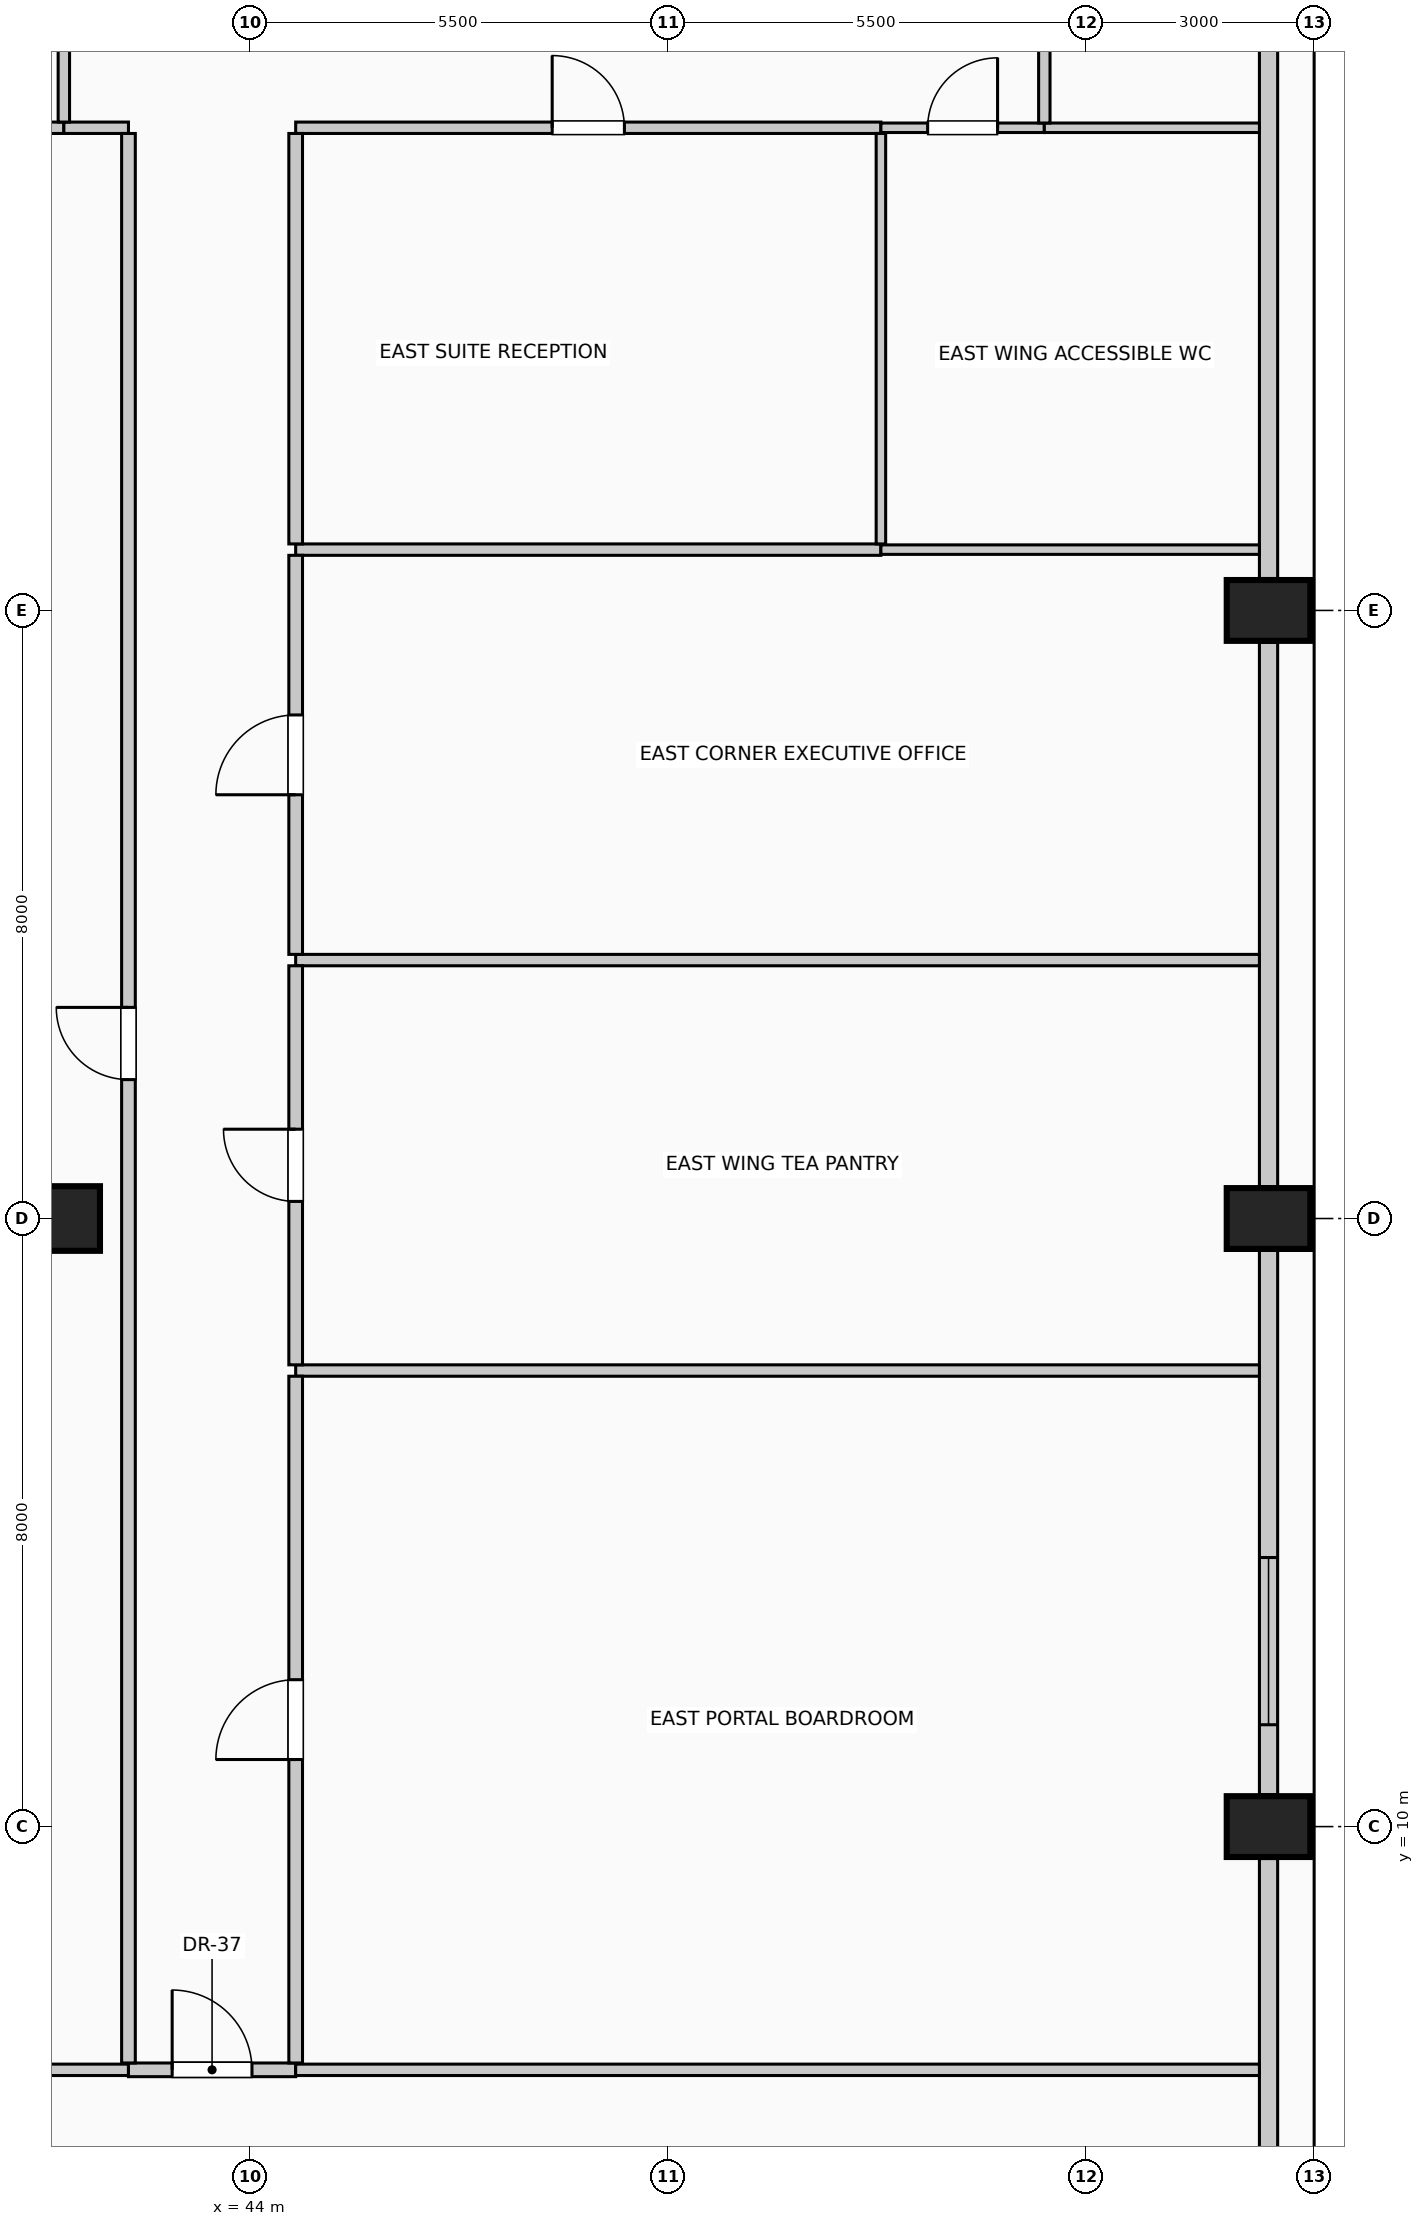
"""IFC4 building model, lengths in metres.
Left out: names, types, materials, properties, quantities, classifications, styles, units other than length and angle.
Written with IfcOpenShell. Run it as: python <this file> out.ifc"""

import sys

from ifc_helpers import new_model, si_unit, direction, frame, frame_2d, origin, origin_2d, place, context, subcontext, project, spatial, rectangle, circle, extrude, element, fill, save


model = new_model("IFC4")
c1 = context("Model", 3, precision=1e-05, world=origin(), true_north=direction((0.0, 1.0)))
c2 = subcontext(c1, "Body", "Model", "MODEL_VIEW")
j1 = project(units=[si_unit("LENGTHUNIT", "METRE"), si_unit("PLANEANGLEUNIT", "RADIAN")], contexts=[c1])
p1 = place(None, origin())
s1 = spatial("IfcSite", under=j1, at=p1, CompositionType="ELEMENT")
p2 = place(p1, origin())
s2 = spatial("IfcBuilding", under=s1, at=p2, CompositionType="ELEMENT")
p3 = place(p2, frame((0.0, 0.0, 186.6)))
s3 = spatial("IfcBuildingStorey", under=s2, at=p3, CompositionType="ELEMENT", Elevation=186.6)
for number, where, z_axis, x_axis in (
    (1, (57.4, 10.0, 0.0), (0.0, 0.0, 1.0), (0.0, 1.0, 0.0)),
    (2, (57.4, 18.0, 0.0), (0.0, 0.0, 1.0), (0.0, 1.0, 0.0)),
    (3, (57.4, 26.0, 0.0), (0.0, 0.0, 1.0), (0.0, 1.0, 0.0)),
):
    element("IfcColumn", number, at=place(p3, frame(where, z_axis=z_axis, x_axis=x_axis)), inside=s3, PredefinedType="COLUMN", context=c2, shape_type="SweptSolid", body=[
        extrude(rectangle(XDim=0.8, YDim=1.1, at=origin_2d()), origin(), (0.0, 0.0, 1.0), 4.0),
    ])
p4 = place(p3, frame((41.6, 18.0, 0.0), z_axis=(0.0, 0.0, 1.0), x_axis=(1.0, 0.0, 0.0)))
e4 = element("IfcColumn", 4, at=p4, inside=s3, PredefinedType="COLUMN", context=c2, shape_type="SweptSolid", body=[
    extrude(circle(Radius=0.425, at=origin_2d()), origin(), (0.0, 0.0, 1.0), 4.0),
])
p5 = place(p3, frame((57.4, 9.58, 0.0), z_axis=(0.0, 0.0, 1.0), x_axis=(0.0, -1.0, 0.0)))
e5 = element("IfcWall", 5, at=p5, inside=s3, PredefinedType="SOLIDWALL", context=c2, shape_type="SweptSolid", body=[
    extrude(rectangle(XDim=5.56, YDim=0.24, at=frame_2d((2.78, 0.0))), origin(), (0.0, 0.0, 1.0), 3.0),
])
p6 = place(p3, frame((57.4, 17.58, 0.0), z_axis=(0.0, 0.0, 1.0), x_axis=(0.0, -1.0, 0.0)))
e6 = element("IfcWall", 6, at=p6, inside=s3, PredefinedType="SOLIDWALL", context=c2, shape_type="SweptSolid", body=[
    extrude(rectangle(XDim=7.16, YDim=0.24, at=frame_2d((3.58, 0.0))), origin(), (0.0, 0.0, 1.0), 3.0),
])
p7 = place(p6, frame((4.04, 0.0, 0.42)))
e7 = element("IfcOpeningElement", 7, at=p7, cuts=e6, PredefinedType="OPENING", context=c2, shape_type="SweptSolid", body=[
    extrude(rectangle(XDim=2.2, YDim=1.95, at=frame_2d((1.1, 0.975))), frame((0.0, 0.13, 0.0), z_axis=(0.0, -1.0, 0.0), x_axis=(1.0, 0.0, 0.0)), (0.0, 0.0, 1.0), 0.26),
])
for number, where, z_axis, x_axis in (
    (8, (57.4, 25.58, 0.0), (0.0, 0.0, 1.0), (0.0, -1.0, 0.0)),
    (9, (57.4, 33.58, 0.0), (0.0, 0.0, 1.0), (0.0, -1.0, 0.0)),
):
    element("IfcWall", number, at=place(p3, frame(where, z_axis=z_axis, x_axis=x_axis)), inside=s3, PredefinedType="SOLIDWALL", context=c2, shape_type="SweptSolid", body=[
        extrude(rectangle(XDim=7.16, YDim=0.24, at=frame_2d((3.58, 0.0))), origin(), (0.0, 0.0, 1.0), 3.0),
    ])
p8 = place(p3, frame((34.12, 6.8, 0.0), z_axis=(0.0, 0.0, 1.0), x_axis=(1.0, 0.0, 0.0)))
e10 = element("IfcWall", 10, at=p8, inside=s3, PredefinedType="PARTITIONING", context=c2, shape_type="SweptSolid", body=[
    extrude(rectangle(XDim=8.28, YDim=0.15, at=frame_2d((4.14, 0.0))), origin(), (0.0, 0.0, 1.0), 3.245),
])
p9 = place(p3, frame((42.4, 6.8, 0.0), z_axis=(0.0, 0.0, 1.0), x_axis=(1.0, 0.0, 0.0)))
e11 = element("IfcWall", 11, at=p9, inside=s3, PredefinedType="PARTITIONING", context=c2, shape_type="SweptSolid", body=[
    extrude(rectangle(XDim=2.2, YDim=0.18, at=frame_2d((1.1, 0.0))), origin(), (0.0, 0.0, 1.0), 3.245),
])
p10 = place(p9, frame((0.575, 0.0, 0.0)))
e12 = element("IfcOpeningElement", 12, at=p10, cuts=e11, PredefinedType="OPENING", context=c2, shape_type="SweptSolid", body=[
    extrude(rectangle(XDim=1.05, YDim=2.15, at=frame_2d((0.525, 1.075))), frame((0.0, 0.1, 0.0), z_axis=(0.0, -1.0, 0.0), x_axis=(1.0, 0.0, 0.0)), (0.0, 0.0, 1.0), 0.2),
])
p11 = place(p3, frame((44.6, 6.8, 0.0), z_axis=(0.0, 0.0, 1.0), x_axis=(1.0, 0.0, 0.0)))
e13 = element("IfcWall", 13, at=p11, inside=s3, PredefinedType="PARTITIONING", context=c2, shape_type="SweptSolid", body=[
    extrude(rectangle(XDim=12.68, YDim=0.15, at=frame_2d((6.34, 0.0))), origin(), (0.0, 0.0, 1.0), 3.245),
])
for number, where, z_axis, x_axis in (
    (14, (44.6, 16.0, 0.0), (0.0, 0.0, 1.0), (1.0, 0.0, 0.0)),
    (15, (44.6, 21.4, 0.0), (0.0, 0.0, 1.0), (1.0, 0.0, 0.0)),
):
    element("IfcWall", number, at=place(p3, frame(where, z_axis=z_axis, x_axis=x_axis)), inside=s3, PredefinedType="PARTITIONING", context=c2, shape_type="SweptSolid", body=[
        extrude(rectangle(XDim=12.68, YDim=0.15, at=frame_2d((6.34, 0.0))), origin(), (0.0, 0.0, 1.0), 3.75),
    ])
p12 = place(p3, frame((44.6, 26.8, 0.0), z_axis=(0.0, 0.0, 1.0), x_axis=(1.0, 0.0, 0.0)))
e16 = element("IfcWall", 16, at=p12, inside=s3, PredefinedType="PARTITIONING", context=c2, shape_type="SweptSolid", body=[
    extrude(rectangle(XDim=7.7, YDim=0.15, at=frame_2d((3.85, 0.0))), origin(), (0.0, 0.0, 1.0), 3.75),
])
p13 = place(p3, frame((52.3, 26.8, 0.0), z_axis=(0.0, 0.0, 1.0), x_axis=(1.0, 0.0, 0.0)))
e17 = element("IfcWall", 17, at=p13, inside=s3, PredefinedType="PARTITIONING", context=c2, shape_type="SweptSolid", body=[
    extrude(rectangle(XDim=4.98, YDim=0.125, at=frame_2d((2.49, 0.0))), origin(), (0.0, 0.0, 1.0), 3.75),
])
p14 = place(p3, frame((34.12, 32.35, 0.0), z_axis=(0.0, 0.0, 1.0), x_axis=(1.0, 0.0, 0.0)))
e18 = element("IfcWall", 18, at=p14, inside=s3, PredefinedType="PARTITIONING", context=c2, shape_type="SweptSolid", body=[
    extrude(rectangle(XDim=7.43, YDim=0.15, at=frame_2d((3.715, 0.0))), origin(), (0.0, 0.0, 1.0), 3.75),
])
p15 = place(p3, frame((41.55, 32.35, 0.0), z_axis=(0.0, 0.0, 1.0), x_axis=(1.0, 0.0, 0.0)))
e19 = element("IfcWall", 19, at=p15, inside=s3, PredefinedType="PARTITIONING", context=c2, shape_type="SweptSolid", body=[
    extrude(rectangle(XDim=0.85, YDim=0.15, at=frame_2d((0.425, 0.0))), origin(), (0.0, 0.0, 1.0), 3.75),
])
p16 = place(p3, frame((44.6, 32.35, 0.0), z_axis=(0.0, 0.0, 1.0), x_axis=(1.0, 0.0, 0.0)))
e20 = element("IfcWall", 20, at=p16, inside=s3, PredefinedType="PARTITIONING", context=c2, shape_type="SweptSolid", body=[
    extrude(rectangle(XDim=7.7, YDim=0.15, at=frame_2d((3.85, 0.0))), origin(), (0.0, 0.0, 1.0), 3.75),
])
p17 = place(p16, frame((3.375, 0.0, 0.0)))
e21 = element("IfcOpeningElement", 21, at=p17, cuts=e20, PredefinedType="OPENING", context=c2, shape_type="SweptSolid", body=[
    extrude(rectangle(XDim=0.95, YDim=2.15, at=frame_2d((0.475, 1.075))), frame((0.0, 0.085, 0.0), z_axis=(0.0, -1.0, 0.0), x_axis=(1.0, 0.0, 0.0)), (0.0, 0.0, 1.0), 0.17),
])
p18 = place(p3, frame((52.3, 32.35, 0.0), z_axis=(0.0, 0.0, 1.0), x_axis=(1.0, 0.0, 0.0)))
e22 = element("IfcWall", 22, at=p18, inside=s3, PredefinedType="PARTITIONING", context=c2, shape_type="SweptSolid", body=[
    extrude(rectangle(XDim=2.15, YDim=0.125, at=frame_2d((1.075, 0.0))), origin(), (0.0, 0.0, 1.0), 3.75),
])
p19 = place(p18, frame((0.615, 0.0, 0.0)))
e23 = element("IfcOpeningElement", 23, at=p19, cuts=e22, PredefinedType="OPENING", context=c2, shape_type="SweptSolid", body=[
    extrude(rectangle(XDim=0.92, YDim=2.1, at=frame_2d((0.46, 1.05))), frame((0.0, 0.073, 0.0), z_axis=(0.0, -1.0, 0.0), x_axis=(1.0, 0.0, 0.0)), (0.0, 0.0, 1.0), 0.145),
])
p20 = place(p3, frame((54.45, 32.35, 0.0), z_axis=(0.0, 0.0, 1.0), x_axis=(1.0, 0.0, 0.0)))
e24 = element("IfcWall", 24, at=p20, inside=s3, PredefinedType="PARTITIONING", context=c2, shape_type="SweptSolid", body=[
    extrude(rectangle(XDim=2.83, YDim=0.125, at=frame_2d((1.415, 0.0))), origin(), (0.0, 0.0, 1.0), 3.75),
])
p21 = place(p3, frame((41.55, 32.425, 0.0), z_axis=(0.0, 0.0, 1.0), x_axis=(0.0, 1.0, 0.0)))
e25 = element("IfcWall", 25, at=p21, inside=s3, PredefinedType="PARTITIONING", context=c2, shape_type="SweptSolid", body=[
    extrude(rectangle(XDim=1.15, YDim=0.15, at=frame_2d((0.575, 0.0))), origin(), (0.0, 0.0, 1.0), 3.145),
])
p22 = place(p3, frame((42.4, 6.89, 0.0), z_axis=(0.0, 0.0, 1.0), x_axis=(0.0, 1.0, 0.0)))
e26 = element("IfcWall", 26, at=p22, inside=s3, PredefinedType="PARTITIONING", context=c2, shape_type="SweptSolid", body=[
    extrude(rectangle(XDim=25.385, YDim=0.18, at=frame_2d((12.692, 0.0))), origin(), (0.0, 0.0, 1.0), 3.75),
])
p23 = place(p22, frame((12.938, 0.0, 0.0)))
e27 = element("IfcOpeningElement", 27, at=p23, cuts=e26, PredefinedType="OPENING", context=c2, shape_type="SweptSolid", body=[
    extrude(rectangle(XDim=0.95, YDim=2.15, at=frame_2d((0.475, 1.075))), frame((0.0, 0.1, 0.0), z_axis=(0.0, -1.0, 0.0), x_axis=(1.0, 0.0, 0.0)), (0.0, 0.0, 1.0), 0.2),
])
p24 = place(p3, frame((44.6, 6.89, 0.0), z_axis=(0.0, 0.0, 1.0), x_axis=(0.0, 1.0, 0.0)))
e28 = element("IfcWall", 28, at=p24, inside=s3, PredefinedType="PARTITIONING", context=c2, shape_type="SweptSolid", body=[
    extrude(rectangle(XDim=9.035, YDim=0.18, at=frame_2d((4.518, 0.0))), origin(), (0.0, 0.0, 1.0), 3.75),
])
p25 = place(p24, frame((3.992, 0.0, 0.0)))
e29 = element("IfcOpeningElement", 29, at=p25, cuts=e28, PredefinedType="OPENING", context=c2, shape_type="SweptSolid", body=[
    extrude(rectangle(XDim=1.05, YDim=2.15, at=frame_2d((0.525, 1.075))), frame((0.0, 0.1, 0.0), z_axis=(0.0, -1.0, 0.0), x_axis=(1.0, 0.0, 0.0)), (0.0, 0.0, 1.0), 0.2),
])
p26 = place(p3, frame((44.6, 16.075, 0.0), z_axis=(0.0, 0.0, 1.0), x_axis=(0.0, 1.0, 0.0)))
e30 = element("IfcWall", 30, at=p26, inside=s3, PredefinedType="PARTITIONING", context=c2, shape_type="SweptSolid", body=[
    extrude(rectangle(XDim=5.25, YDim=0.18, at=frame_2d((2.625, 0.0))), origin(), (0.0, 0.0, 1.0), 3.75),
])
p27 = place(p26, frame((2.15, 0.0, 0.0)))
e31 = element("IfcOpeningElement", 31, at=p27, cuts=e30, PredefinedType="OPENING", context=c2, shape_type="SweptSolid", body=[
    extrude(rectangle(XDim=0.95, YDim=2.15, at=frame_2d((0.475, 1.075))), frame((0.0, 0.1, 0.0), z_axis=(0.0, -1.0, 0.0), x_axis=(1.0, 0.0, 0.0)), (0.0, 0.0, 1.0), 0.2),
])
p28 = place(p3, frame((44.6, 21.475, 0.0), z_axis=(0.0, 0.0, 1.0), x_axis=(0.0, 1.0, 0.0)))
e32 = element("IfcWall", 32, at=p28, inside=s3, PredefinedType="PARTITIONING", context=c2, shape_type="SweptSolid", body=[
    extrude(rectangle(XDim=5.25, YDim=0.18, at=frame_2d((2.625, 0.0))), origin(), (0.0, 0.0, 1.0), 3.75),
])
p29 = place(p28, frame((2.1, 0.0, 0.0)))
e33 = element("IfcOpeningElement", 33, at=p29, cuts=e32, PredefinedType="OPENING", context=c2, shape_type="SweptSolid", body=[
    extrude(rectangle(XDim=1.05, YDim=2.15, at=frame_2d((0.525, 1.075))), frame((0.0, 0.1, 0.0), z_axis=(0.0, -1.0, 0.0), x_axis=(1.0, 0.0, 0.0)), (0.0, 0.0, 1.0), 0.2),
])
p30 = place(p3, frame((44.6, 26.875, 0.0), z_axis=(0.0, 0.0, 1.0), x_axis=(0.0, 1.0, 0.0)))
e34 = element("IfcWall", 34, at=p30, inside=s3, PredefinedType="PARTITIONING", context=c2, shape_type="SweptSolid", body=[
    extrude(rectangle(XDim=5.4, YDim=0.18, at=frame_2d((2.7, 0.0))), origin(), (0.0, 0.0, 1.0), 3.75),
])
p31 = place(p3, frame((52.3, 26.875, 0.0), z_axis=(0.0, 0.0, 1.0), x_axis=(0.0, 1.0, 0.0)))
e35 = element("IfcWall", 35, at=p31, inside=s3, PredefinedType="PARTITIONING", context=c2, shape_type="SweptSolid", body=[
    extrude(rectangle(XDim=5.4, YDim=0.125, at=frame_2d((2.7, 0.0))), origin(), (0.0, 0.0, 1.0), 3.75),
])
p32 = place(p3, frame((54.45, 32.413, 0.0), z_axis=(0.0, 0.0, 1.0), x_axis=(0.0, 1.0, 0.0)))
e36 = element("IfcWall", 36, at=p32, inside=s3, PredefinedType="PARTITIONING", context=c2, shape_type="SweptSolid", body=[
    extrude(rectangle(XDim=1.737, YDim=0.15, at=frame_2d((0.869, 0.0))), origin(), (0.0, 0.0, 1.0), 3.75),
])
p33 = place(p7, origin())
e37 = element("IfcWindow", 37, at=p33, inside=s3, PartitioningType="SINGLE_PANEL", PredefinedType="WINDOW", context=c2, shape_type="SweptSolid", body=[
    extrude(rectangle(XDim=2.2, YDim=1.95, at=frame_2d((1.1, 0.975))), frame((0.0, 0.03, 0.0), z_axis=(0.0, -1.0, 0.0), x_axis=(1.0, 0.0, 0.0)), (0.0, 0.0, 1.0), 0.06),
])
fill(e7, e37)
p34 = place(p10, origin())
e38 = element("IfcDoor", 38, at=p34, inside=s3, OperationType="SINGLE_SWING_LEFT", PredefinedType="DOOR", context=c2, shape_type="SweptSolid", body=[
    extrude(rectangle(XDim=1.05, YDim=2.15, at=frame_2d((0.525, 1.075))), frame((0.0, 0.025, 0.0), z_axis=(0.0, -1.0, 0.0), x_axis=(1.0, 0.0, 0.0)), (0.0, 0.0, 1.0), 0.05),
])
fill(e12, e38)
p35 = place(p17, origin())
e39 = element("IfcDoor", 39, at=p35, inside=s3, OperationType="SINGLE_SWING_LEFT", PredefinedType="DOOR", context=c2, shape_type="SweptSolid", body=[
    extrude(rectangle(XDim=0.95, YDim=2.15, at=frame_2d((0.475, 1.075))), frame((0.0, 0.025, 0.0), z_axis=(0.0, -1.0, 0.0), x_axis=(1.0, 0.0, 0.0)), (0.0, 0.0, 1.0), 0.05),
])
fill(e21, e39)
p36 = place(p19, origin())
e40 = element("IfcDoor", 40, at=p36, inside=s3, OperationType="SINGLE_SWING_RIGHT", PredefinedType="DOOR", context=c2, shape_type="SweptSolid", body=[
    extrude(rectangle(XDim=0.92, YDim=2.1, at=frame_2d((0.46, 1.05))), frame((0.0, 0.025, 0.0), z_axis=(0.0, -1.0, 0.0), x_axis=(1.0, 0.0, 0.0)), (0.0, 0.0, 1.0), 0.05),
])
fill(e23, e40)
p37 = place(p23, origin())
e41 = element("IfcDoor", 41, at=p37, inside=s3, OperationType="SINGLE_SWING_RIGHT", PredefinedType="DOOR", context=c2, shape_type="SweptSolid", body=[
    extrude(rectangle(XDim=0.95, YDim=2.15, at=frame_2d((0.475, 1.075))), frame((0.0, 0.025, 0.0), z_axis=(0.0, -1.0, 0.0), x_axis=(1.0, 0.0, 0.0)), (0.0, 0.0, 1.0), 0.05),
])
fill(e27, e41)
p38 = place(p25, origin())
e42 = element("IfcDoor", 42, at=p38, inside=s3, OperationType="SINGLE_SWING_LEFT", PredefinedType="DOOR", context=c2, shape_type="SweptSolid", body=[
    extrude(rectangle(XDim=1.05, YDim=2.15, at=frame_2d((0.525, 1.075))), frame((0.0, 0.025, 0.0), z_axis=(0.0, -1.0, 0.0), x_axis=(1.0, 0.0, 0.0)), (0.0, 0.0, 1.0), 0.05),
])
fill(e29, e42)
p39 = place(p27, origin())
e43 = element("IfcDoor", 43, at=p39, inside=s3, OperationType="SINGLE_SWING_RIGHT", PredefinedType="DOOR", context=c2, shape_type="SweptSolid", body=[
    extrude(rectangle(XDim=0.95, YDim=2.15, at=frame_2d((0.475, 1.075))), frame((0.0, 0.025, 0.0), z_axis=(0.0, -1.0, 0.0), x_axis=(1.0, 0.0, 0.0)), (0.0, 0.0, 1.0), 0.05),
])
fill(e31, e43)
p40 = place(p29, origin())
e44 = element("IfcDoor", 44, at=p40, inside=s3, OperationType="SINGLE_SWING_LEFT", PredefinedType="DOOR", context=c2, shape_type="SweptSolid", body=[
    extrude(rectangle(XDim=1.05, YDim=2.15, at=frame_2d((0.525, 1.075))), frame((0.0, 0.025, 0.0), z_axis=(0.0, -1.0, 0.0), x_axis=(1.0, 0.0, 0.0)), (0.0, 0.0, 1.0), 0.05),
])
fill(e33, e44)
save(model, sys.argv[1])
